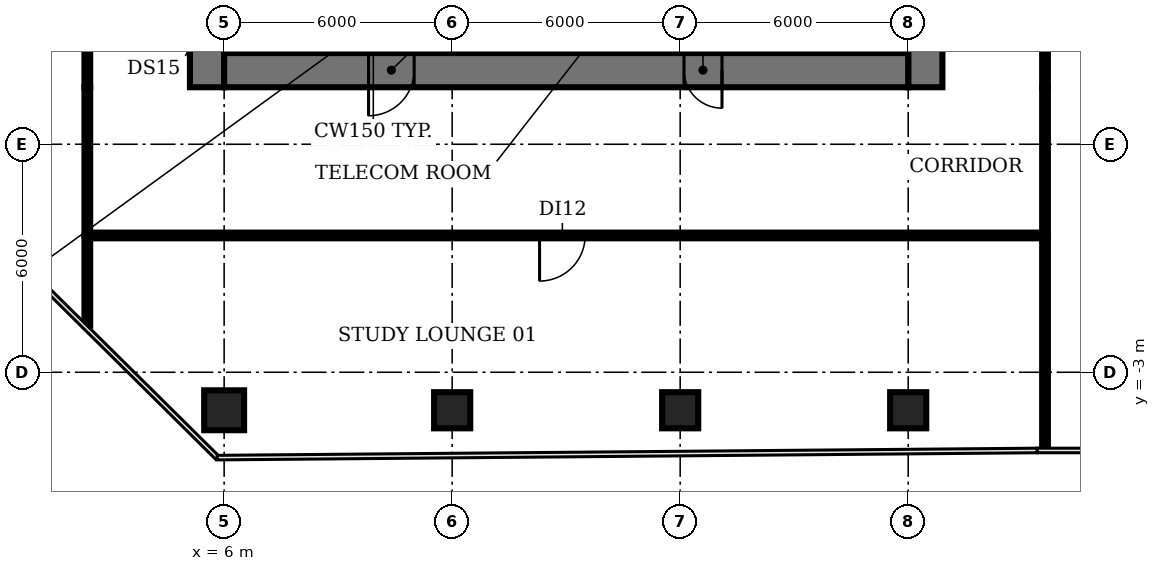
"""IFC4 building model, lengths in metres.
Left out: names, types, materials, properties, quantities, classifications, styles, units other than length and angle.
Written with IfcOpenShell. Run it as: python <this file> out.ifc"""

import sys

from ifc_helpers import new_model, si_unit, direction, frame, frame_2d, origin, origin_2d, place, context, subcontext, project, spatial, rectangle, circle, extrude, element, fill, save


model = new_model("IFC4")
c1 = context("Model", 3, precision=1e-05, world=origin(), true_north=direction((0.0, 1.0)))
c2 = subcontext(c1, "Body", "Model", "MODEL_VIEW")
j1 = project(units=[si_unit("LENGTHUNIT", "METRE"), si_unit("PLANEANGLEUNIT", "RADIAN")], contexts=[c1])
p1 = place(None, origin())
s1 = spatial("IfcSite", under=j1, at=p1, CompositionType="ELEMENT")
p2 = place(p1, origin())
s2 = spatial("IfcBuilding", under=s1, at=p2, CompositionType="ELEMENT")
p3 = place(p2, frame((0.0, 0.0, 54.2)))
s3 = spatial("IfcBuildingStorey", under=s2, at=p3, CompositionType="ELEMENT", Elevation=54.2)
p4 = place(p3, frame((6.0, -4.0, 0.0), z_axis=(0.0, 0.0, 1.0), x_axis=(1.0, 0.0, 0.0)))
e1 = element("IfcColumn", 1, at=p4, inside=s3, PredefinedType="COLUMN", context=c2, shape_type="SweptSolid", body=[
    extrude(circle(Radius=0.525, at=origin_2d()), origin(), (0.0, 0.0, 1.0), 3.85),
])
for number, where, z_axis, x_axis in (
    (2, (12.0, -4.0, 0.0), (0.0, 0.0, 1.0), (1.0, 0.0, 0.0)),
    (3, (18.0, -4.0, 0.0), (0.0, 0.0, 1.0), (1.0, 0.0, 0.0)),
    (4, (24.0, -4.0, 0.0), (0.0, 0.0, 1.0), (1.0, 0.0, 0.0)),
):
    element("IfcColumn", number, at=place(p3, frame(where, z_axis=z_axis, x_axis=x_axis)), inside=s3, PredefinedType="COLUMN", context=c2, shape_type="SweptSolid", body=[
        extrude(rectangle(XDim=0.95, YDim=0.95, at=origin_2d()), origin(), (0.0, 0.0, 1.0), 3.85),
    ])
p5 = place(p3, frame((9.275, 11.825, 0.0), z_axis=(0.0, 0.0, 1.0), x_axis=(0.0, -1.0, 0.0)))
e5 = element("IfcWall", 5, at=p5, inside=s3, PredefinedType="SHEAR", context=c2, shape_type="SweptSolid", body=[
    extrude(rectangle(XDim=6.425, YDim=0.25, at=frame_2d((3.212, 0.0))), origin(), (0.0, 0.0, 1.0), 3.85),
])
p6 = place(p5, frame((5.075, 0.0, 0.0)))
e6 = element("IfcOpeningElement", 6, at=p6, cuts=e5, PredefinedType="OPENING", context=c2, shape_type="SweptSolid", body=[
    extrude(rectangle(XDim=1.0, YDim=2.1, at=frame_2d((0.5, 1.05))), frame((0.0, 0.135, 0.0), z_axis=(0.0, -1.0, 0.0), x_axis=(1.0, 0.0, 0.0)), (0.0, 0.0, 1.0), 0.27),
])
p7 = place(p3, frame((13.5, 5.4, 0.0), z_axis=(0.0, 0.0, 1.0), x_axis=(0.0, 1.0, 0.0)))
e7 = element("IfcWall", 7, at=p7, inside=s3, PredefinedType="SHEAR", context=c2, shape_type="SweptSolid", body=[
    extrude(rectangle(XDim=8.2, YDim=0.2, at=frame_2d((4.1, 0.0))), origin(), (0.0, 0.0, 1.0), 3.85),
])
p8 = place(p7, frame((0.75, 0.0, 0.0)))
e8 = element("IfcOpeningElement", 8, at=p8, cuts=e7, PredefinedType="OPENING", context=c2, shape_type="SweptSolid", body=[
    extrude(rectangle(XDim=1.1, YDim=2.1, at=frame_2d((0.55, 1.05))), frame((0.0, 0.11, 0.0), z_axis=(0.0, -1.0, 0.0), x_axis=(1.0, 0.0, 0.0)), (0.0, 0.0, 1.0), 0.22),
])
p9 = place(p7, frame((3.55, 0.0, 0.0)))
e9 = element("IfcOpeningElement", 9, at=p9, cuts=e7, PredefinedType="OPENING", context=c2, shape_type="SweptSolid", body=[
    extrude(rectangle(XDim=1.1, YDim=2.1, at=frame_2d((0.55, 1.05))), frame((0.0, 0.11, 0.0), z_axis=(0.0, -1.0, 0.0), x_axis=(1.0, 0.0, 0.0)), (0.0, 0.0, 1.0), 0.22),
])
p10 = place(p7, frame((6.35, 0.0, 0.0)))
e10 = element("IfcOpeningElement", 10, at=p10, cuts=e7, PredefinedType="OPENING", context=c2, shape_type="SweptSolid", body=[
    extrude(rectangle(XDim=1.1, YDim=2.1, at=frame_2d((0.55, 1.05))), frame((0.0, 0.11, 0.0), z_axis=(0.0, -1.0, 0.0), x_axis=(1.0, 0.0, 0.0)), (0.0, 0.0, 1.0), 0.22),
])
p11 = place(p3, frame((16.5, 5.4, 0.0), z_axis=(0.0, 0.0, 1.0), x_axis=(0.0, 1.0, 0.0)))
e11 = element("IfcWall", 11, at=p11, inside=s3, PredefinedType="SHEAR", context=c2, shape_type="SweptSolid", body=[
    extrude(rectangle(XDim=8.2, YDim=0.2, at=frame_2d((4.1, 0.0))), origin(), (0.0, 0.0, 1.0), 3.85),
])
p12 = place(p3, frame((20.725, 5.4, 0.0), z_axis=(0.0, 0.0, 1.0), x_axis=(0.0, 1.0, 0.0)))
e12 = element("IfcWall", 12, at=p12, inside=s3, PredefinedType="SHEAR", context=c2, shape_type="SweptSolid", body=[
    extrude(rectangle(XDim=6.3, YDim=0.25, at=frame_2d((3.15, 0.0))), origin(), (0.0, 0.0, 1.0), 3.85),
])
p13 = place(p3, frame((5.55, 4.5, 0.0), z_axis=(0.0, 0.0, 1.0), x_axis=(0.0, 1.0, 0.0)))
e13 = element("IfcWall", 13, at=p13, inside=s3, PredefinedType="SHEAR", context=c2, shape_type="SweptSolid", body=[
    extrude(rectangle(XDim=21.2, YDim=0.9, at=frame_2d((10.6, 0.0))), origin(), (0.0, 0.0, 1.0), 3.85),
])
p14 = place(p13, frame((1.15, 0.0, 0.0)))
e14 = element("IfcOpeningElement", 14, at=p14, cuts=e13, PredefinedType="OPENING", context=c2, shape_type="SweptSolid", body=[
    extrude(rectangle(XDim=1.5, YDim=2.1, at=frame_2d((0.75, 1.05))), frame((0.0, 0.46, 0.0), z_axis=(0.0, -1.0, 0.0), x_axis=(1.0, 0.0, 0.0)), (0.0, 0.0, 1.0), 0.92),
])
p15 = place(p13, frame((7.6, 0.0, 0.0)))
e15 = element("IfcOpeningElement", 15, at=p15, cuts=e13, PredefinedType="OPENING", context=c2, shape_type="SweptSolid", body=[
    extrude(rectangle(XDim=1.2, YDim=2.1, at=frame_2d((0.6, 1.05))), frame((0.0, 0.46, 0.0), z_axis=(0.0, -1.0, 0.0), x_axis=(1.0, 0.0, 0.0)), (0.0, 0.0, 1.0), 0.92),
])
p16 = place(p13, frame((14.15, 0.0, 0.0)))
e16 = element("IfcOpeningElement", 16, at=p16, cuts=e13, PredefinedType="OPENING", context=c2, shape_type="SweptSolid", body=[
    extrude(rectangle(XDim=1.2, YDim=2.1, at=frame_2d((0.6, 1.05))), frame((0.0, 0.46, 0.0), z_axis=(0.0, -1.0, 0.0), x_axis=(1.0, 0.0, 0.0)), (0.0, 0.0, 1.0), 0.92),
])
p17 = place(p3, frame((24.45, 25.7, 0.0), z_axis=(0.0, 0.0, 1.0), x_axis=(0.0, -1.0, 0.0)))
e17 = element("IfcWall", 17, at=p17, inside=s3, PredefinedType="SHEAR", context=c2, shape_type="SweptSolid", body=[
    extrude(rectangle(XDim=21.2, YDim=0.9, at=frame_2d((10.6, 0.0))), origin(), (0.0, 0.0, 1.0), 3.85),
])
p18 = place(p17, frame((18.55, 0.0, 0.0)))
e18 = element("IfcOpeningElement", 18, at=p18, cuts=e17, PredefinedType="OPENING", context=c2, shape_type="SweptSolid", body=[
    extrude(rectangle(XDim=1.5, YDim=2.1, at=frame_2d((0.75, 1.05))), frame((0.0, 0.46, 0.0), z_axis=(0.0, -1.0, 0.0), x_axis=(1.0, 0.0, 0.0)), (0.0, 0.0, 1.0), 0.92),
])
p19 = place(p17, frame((12.45, 0.0, 0.0)))
e19 = element("IfcOpeningElement", 19, at=p19, cuts=e17, PredefinedType="OPENING", context=c2, shape_type="SweptSolid", body=[
    extrude(rectangle(XDim=0.9, YDim=2.1, at=frame_2d((0.45, 1.05))), frame((0.0, 0.46, 0.0), z_axis=(0.0, -1.0, 0.0), x_axis=(1.0, 0.0, 0.0)), (0.0, 0.0, 1.0), 0.92),
])
p20 = place(p17, frame((6.45, 0.0, 0.0)))
e20 = element("IfcOpeningElement", 20, at=p20, cuts=e17, PredefinedType="OPENING", context=c2, shape_type="SweptSolid", body=[
    extrude(rectangle(XDim=2.0, YDim=2.1, at=frame_2d((1.0, 1.05))), frame((0.0, 0.46, 0.0), z_axis=(0.0, -1.0, 0.0), x_axis=(1.0, 0.0, 0.0)), (0.0, 0.0, 1.0), 0.92),
])
p21 = place(p3, frame((24.0, 4.95, 0.0), z_axis=(0.0, 0.0, 1.0), x_axis=(-1.0, 0.0, 0.0)))
e21 = element("IfcWall", 21, at=p21, inside=s3, PredefinedType="SHEAR", context=c2, shape_type="SweptSolid", body=[
    extrude(rectangle(XDim=18.0, YDim=0.9, at=frame_2d((9.0, 0.0))), origin(), (0.0, 0.0, 1.0), 3.85),
])
p22 = place(p21, frame((13.0, 0.0, 0.0)))
e22 = element("IfcOpeningElement", 22, at=p22, cuts=e21, PredefinedType="OPENING", context=c2, shape_type="SweptSolid", body=[
    extrude(rectangle(XDim=1.2, YDim=2.1, at=frame_2d((0.6, 1.05))), frame((0.0, 0.46, 0.0), z_axis=(0.0, -1.0, 0.0), x_axis=(1.0, 0.0, 0.0)), (0.0, 0.0, 1.0), 0.92),
])
p23 = place(p21, frame((4.9, 0.0, 0.0)))
e23 = element("IfcOpeningElement", 23, at=p23, cuts=e21, PredefinedType="OPENING", context=c2, shape_type="SweptSolid", body=[
    extrude(rectangle(XDim=1.0, YDim=2.1, at=frame_2d((0.5, 1.05))), frame((0.0, 0.46, 0.0), z_axis=(0.0, -1.0, 0.0), x_axis=(1.0, 0.0, 0.0)), (0.0, 0.0, 1.0), 0.92),
])
p24 = place(p3, frame((2.4, -1.777, 0.0), z_axis=(0.0, 0.0, 1.0), x_axis=(0.0, 1.0, 0.0)))
e24 = element("IfcWall", 24, at=p24, inside=s3, PredefinedType="PARTITIONING", context=c2, shape_type="SweptSolid", body=[
    extrude(rectangle(XDim=2.377, YDim=0.15, at=frame_2d((1.189, 0.0))), origin(), (0.0, 0.0, 1.0), 2.83),
])
p25 = place(p3, frame((2.4, 0.6, 0.0), z_axis=(0.0, 0.0, 1.0), x_axis=(0.0, 1.0, 0.0)))
e25 = element("IfcWall", 25, at=p25, inside=s3, PredefinedType="PARTITIONING", context=c2, shape_type="SweptSolid", body=[
    extrude(rectangle(XDim=3.9, YDim=0.15, at=frame_2d((1.95, 0.0))), origin(), (0.0, 0.0, 1.0), 2.83),
])
p26 = place(p3, frame((2.4, 4.5, 0.0), z_axis=(0.0, 0.0, 1.0), x_axis=(0.0, 1.0, 0.0)))
e26 = element("IfcWall", 26, at=p26, inside=s3, PredefinedType="PARTITIONING", context=c2, shape_type="SweptSolid", body=[
    extrude(rectangle(XDim=21.2, YDim=0.15, at=frame_2d((10.6, 0.0))), origin(), (0.0, 0.0, 1.0), 2.83),
])
p27 = place(p26, frame((10.8, 0.0, 0.0)))
e27 = element("IfcOpeningElement", 27, at=p27, cuts=e26, PredefinedType="OPENING", context=c2, shape_type="SweptSolid", body=[
    extrude(rectangle(XDim=1.2, YDim=2.1, at=frame_2d((0.6, 1.05))), frame((0.0, 0.085, 0.0), z_axis=(0.0, -1.0, 0.0), x_axis=(1.0, 0.0, 0.0)), (0.0, 0.0, 1.0), 0.17),
])
p28 = place(p3, frame((27.6, -5.01, 0.0), z_axis=(0.0, 0.0, 1.0), x_axis=(0.0, 1.0, 0.0)))
e28 = element("IfcWall", 28, at=p28, inside=s3, PredefinedType="PARTITIONING", context=c2, shape_type="SweptSolid", body=[
    extrude(rectangle(XDim=5.61, YDim=0.15, at=frame_2d((2.805, 0.0))), origin(), (0.0, 0.0, 1.0), 2.83),
])
p29 = place(p3, frame((27.6, 0.6, 0.0), z_axis=(0.0, 0.0, 1.0), x_axis=(-1.0, 0.0, 0.0)))
e29 = element("IfcWall", 29, at=p29, inside=s3, PredefinedType="PARTITIONING", context=c2, shape_type="SweptSolid", body=[
    extrude(rectangle(XDim=25.2, YDim=0.15, at=frame_2d((12.6, 0.0))), origin(), (0.0, 0.0, 1.0), 2.83),
])
p30 = place(p29, frame((12.1, 0.0, 0.0)))
e30 = element("IfcOpeningElement", 30, at=p30, cuts=e29, PredefinedType="OPENING", context=c2, shape_type="SweptSolid", body=[
    extrude(rectangle(XDim=1.2, YDim=2.1, at=frame_2d((0.6, 1.05))), frame((0.0, 0.085, 0.0), z_axis=(0.0, -1.0, 0.0), x_axis=(1.0, 0.0, 0.0)), (0.0, 0.0, 1.0), 0.17),
])
p31 = place(p3, frame((27.6, 0.6, 0.0), z_axis=(0.0, 0.0, 1.0), x_axis=(0.0, 1.0, 0.0)))
e31 = element("IfcWall", 31, at=p31, inside=s3, PredefinedType="PARTITIONING", context=c2, shape_type="SweptSolid", body=[
    extrude(rectangle(XDim=3.9, YDim=0.15, at=frame_2d((1.95, 0.0))), origin(), (0.0, 0.0, 1.0), 2.83),
])
p32 = place(p3, frame((27.6, 15.0, 0.0), z_axis=(0.0, 0.0, 1.0), x_axis=(0.0, -1.0, 0.0)))
e32 = element("IfcWall", 32, at=p32, inside=s3, PredefinedType="PARTITIONING", context=c2, shape_type="SweptSolid", body=[
    extrude(rectangle(XDim=10.5, YDim=0.15, at=frame_2d((5.25, 0.0))), origin(), (0.0, 0.0, 1.0), 2.83),
])
p33 = place(p32, frame((4.8, 0.0, 0.0)))
e33 = element("IfcOpeningElement", 33, at=p33, cuts=e32, PredefinedType="OPENING", context=c2, shape_type="SweptSolid", body=[
    extrude(rectangle(XDim=1.0, YDim=2.1, at=frame_2d((0.5, 1.05))), frame((0.0, 0.085, 0.0), z_axis=(0.0, -1.0, 0.0), x_axis=(1.0, 0.0, 0.0)), (0.0, 0.0, 1.0), 0.17),
])
p34 = place(p22, origin())
e34 = element("IfcDoor", 34, at=p34, inside=s3, OperationType="SINGLE_SWING_RIGHT", PredefinedType="DOOR", context=c2, shape_type="SweptSolid", body=[
    extrude(rectangle(XDim=1.2, YDim=2.1, at=frame_2d((0.6, 1.05))), frame((0.0, 0.025, 0.0), z_axis=(0.0, -1.0, 0.0), x_axis=(1.0, 0.0, 0.0)), (0.0, 0.0, 1.0), 0.05),
])
fill(e22, e34)
p35 = place(p23, origin())
e35 = element("IfcDoor", 35, at=p35, inside=s3, OperationType="SINGLE_SWING_LEFT", PredefinedType="DOOR", context=c2, shape_type="SweptSolid", body=[
    extrude(rectangle(XDim=1.0, YDim=2.1, at=frame_2d((0.5, 1.05))), frame((0.0, -0.39, 0.0), z_axis=(0.0, -1.0, 0.0), x_axis=(1.0, 0.0, 0.0)), (0.0, 0.0, 1.0), 0.05),
])
fill(e23, e35)
p36 = place(p30, origin())
e36 = element("IfcDoor", 36, at=p36, inside=s3, OperationType="SINGLE_SWING_RIGHT", PredefinedType="DOOR", context=c2, shape_type="SweptSolid", body=[
    extrude(rectangle(XDim=1.2, YDim=2.1, at=frame_2d((0.6, 1.05))), frame((0.0, 0.025, 0.0), z_axis=(0.0, -1.0, 0.0), x_axis=(1.0, 0.0, 0.0)), (0.0, 0.0, 1.0), 0.05),
])
fill(e30, e36)
save(model, sys.argv[1])
